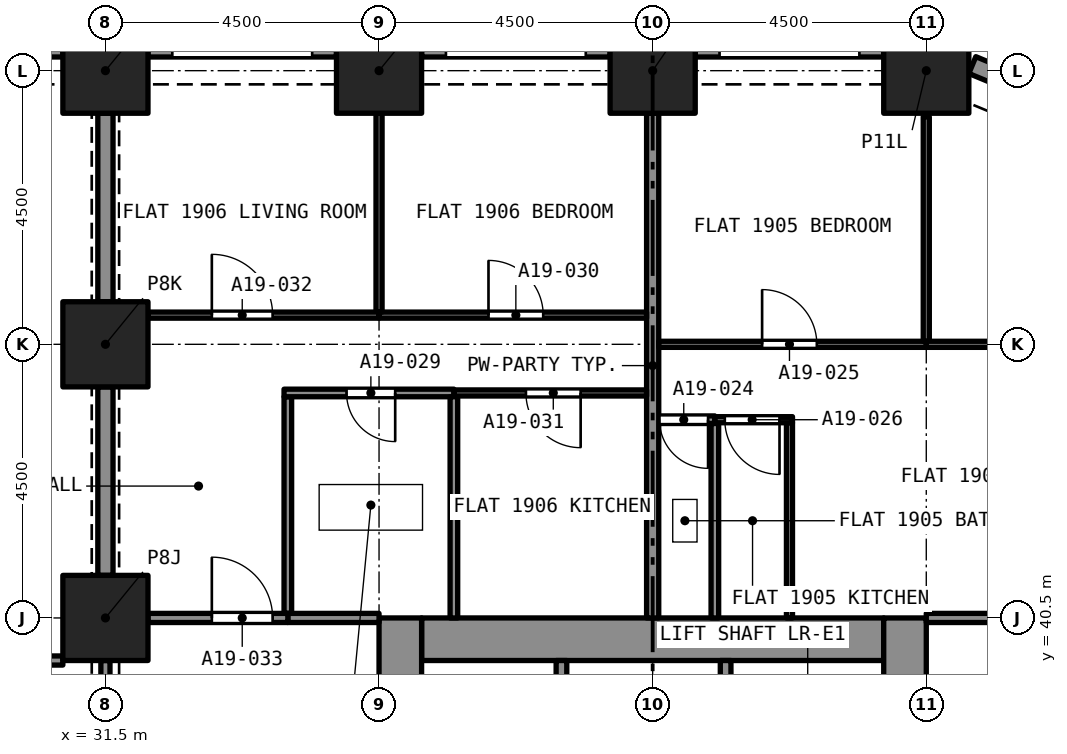
"""IFC4 building model, lengths in metres.
Left out: names, types, materials, properties, quantities, classifications, styles, units other than length and angle.
Written with IfcOpenShell. Run it as: python <this file> out.ifc"""

import sys

from ifc_helpers import new_model, si_unit, direction, frame, frame_2d, origin, origin_2d, place, context, subcontext, project, spatial, rectangle, extrude, element, fill, save


model = new_model("IFC4")
c1 = context("Model", 3, precision=1e-05, world=origin(), true_north=direction((0.0, 1.0)))
c2 = subcontext(c1, "Body", "Model", "MODEL_VIEW")
j1 = project(units=[si_unit("LENGTHUNIT", "METRE"), si_unit("PLANEANGLEUNIT", "RADIAN")], contexts=[c1])
p1 = place(None, origin())
s1 = spatial("IfcSite", under=j1, at=p1, CompositionType="ELEMENT")
p2 = place(p1, origin())
s2 = spatial("IfcBuilding", under=s1, at=p2, CompositionType="ELEMENT")
p3 = place(p2, frame((0.0, 0.0, 72.0)))
s3 = spatial("IfcBuildingStorey", under=s2, at=p3, CompositionType="ELEMENT", Elevation=72.0)
for number, where, z_axis, x_axis in (
    (1, (31.5, 40.5, 0.0), (0.0, 0.0, 1.0), (1.0, 0.0, 0.0)),
    (2, (31.5, 45.0, 0.0), (0.0, 0.0, 1.0), (1.0, 0.0, 0.0)),
    (3, (31.5, 49.5, 0.0), (0.0, 0.0, 1.0), (1.0, 0.0, 0.0)),
    (4, (36.0, 49.5, 0.0), (0.0, 0.0, 1.0), (1.0, 0.0, 0.0)),
    (5, (40.5, 49.5, 0.0), (0.0, 0.0, 1.0), (1.0, 0.0, 0.0)),
    (6, (45.0, 49.5, 0.0), (0.0, 0.0, 1.0), (1.0, 0.0, 0.0)),
):
    element("IfcColumn", number, at=place(p3, frame(where, z_axis=z_axis, x_axis=x_axis)), inside=s3, PredefinedType="COLUMN", context=c2, shape_type="SweptSolid", body=[
        extrude(rectangle(XDim=1.4, YDim=1.4, at=origin_2d()), origin(), (0.0, 0.0, 1.0), 3.2),
    ])
p4 = place(p3, frame((36.7, 40.15, 0.0), z_axis=(0.0, 0.0, 1.0), x_axis=(1.0, 0.0, 0.0)))
e7 = element("IfcWall", 7, at=p4, inside=s3, PredefinedType="SOLIDWALL", context=c2, shape_type="SweptSolid", body=[
    extrude(rectangle(XDim=7.6, YDim=0.7, at=frame_2d((3.8, 0.0))), origin(), (0.0, 0.0, 1.0), 3.2),
])
p5 = place(p3, frame((36.35, 27.0, 0.0), z_axis=(0.0, 0.0, 1.0), x_axis=(0.0, 1.0, 0.0)))
e8 = element("IfcWall", 8, at=p5, inside=s3, PredefinedType="SOLIDWALL", context=c2, shape_type="SweptSolid", body=[
    extrude(rectangle(XDim=13.5, YDim=0.7, at=frame_2d((6.75, 0.0))), origin(), (0.0, 0.0, 1.0), 3.2),
])
p6 = place(p5, frame((8.95, 0.0, 0.0)))
e9 = element("IfcOpeningElement", 9, at=p6, cuts=e8, PredefinedType="OPENING", context=c2, shape_type="SweptSolid", body=[
    extrude(rectangle(XDim=1.2, YDim=2.1, at=frame_2d((0.6, 1.05))), frame((0.0, 0.36, 0.0), z_axis=(0.0, -1.0, 0.0), x_axis=(1.0, 0.0, 0.0)), (0.0, 0.0, 1.0), 0.72),
])
p7 = place(p3, frame((44.65, 27.0, 0.0), z_axis=(0.0, 0.0, 1.0), x_axis=(0.0, 1.0, 0.0)))
e10 = element("IfcWall", 10, at=p7, inside=s3, PredefinedType="SOLIDWALL", context=c2, shape_type="SweptSolid", body=[
    extrude(rectangle(XDim=13.5, YDim=0.7, at=frame_2d((6.75, 0.0))), origin(), (0.0, 0.0, 1.0), 3.2),
])
p8 = place(p7, frame((8.95, 0.0, 0.0)))
e11 = element("IfcOpeningElement", 11, at=p8, cuts=e10, PredefinedType="OPENING", context=c2, shape_type="SweptSolid", body=[
    extrude(rectangle(XDim=1.2, YDim=2.1, at=frame_2d((0.6, 1.05))), frame((0.0, 0.36, 0.0), z_axis=(0.0, -1.0, 0.0), x_axis=(1.0, 0.0, 0.0)), (0.0, 0.0, 1.0), 0.72),
])
p9 = place(p3, frame((45.757, 49.592, 0.0), z_axis=(0.0, 0.0, 1.0), x_axis=(0.923857286003, -0.382737135771, 0.0)))
e12 = element("IfcWall", 12, at=p9, inside=s3, PredefinedType="SOLIDWALL", context=c2, shape_type="SweptSolid", body=[
    extrude(rectangle(XDim=1.865, YDim=0.3, at=frame_2d((0.933, 0.0))), origin(), (0.0, 0.0, 1.0), 3.2),
])
p10 = place(p9, frame((0.508, 0.0, 0.45)))
e13 = element("IfcOpeningElement", 13, at=p10, cuts=e12, PredefinedType="OPENING", context=c2, shape_type="SweptSolid", body=[
    extrude(rectangle(XDim=1.1, YDim=1.95, at=frame_2d((0.55, 0.975))), frame((0.0, 0.16, 0.0), z_axis=(0.0, -1.0, 0.0), x_axis=(1.0, 0.0, 0.0)), (0.0, 0.0, 1.0), 0.32),
])
p11 = place(p3, frame((41.2, 49.875, 0.0), z_axis=(0.0, 0.0, 1.0), x_axis=(1.0, 0.0, 0.0)))
e14 = element("IfcWall", 14, at=p11, inside=s3, PredefinedType="SOLIDWALL", context=c2, shape_type="SweptSolid", body=[
    extrude(rectangle(XDim=3.1, YDim=0.3, at=frame_2d((1.55, 0.0))), origin(), (0.0, 0.0, 1.0), 3.2),
])
p12 = place(p11, frame((0.4, 0.0, 0.45)))
e15 = element("IfcOpeningElement", 15, at=p12, cuts=e14, PredefinedType="OPENING", context=c2, shape_type="SweptSolid", body=[
    extrude(rectangle(XDim=2.3, YDim=1.95, at=frame_2d((1.15, 0.975))), frame((0.0, 0.16, 0.0), z_axis=(0.0, -1.0, 0.0), x_axis=(1.0, 0.0, 0.0)), (0.0, 0.0, 1.0), 0.32),
])
p13 = place(p3, frame((36.7, 49.875, 0.0), z_axis=(0.0, 0.0, 1.0), x_axis=(1.0, 0.0, 0.0)))
e16 = element("IfcWall", 16, at=p13, inside=s3, PredefinedType="SOLIDWALL", context=c2, shape_type="SweptSolid", body=[
    extrude(rectangle(XDim=3.1, YDim=0.3, at=frame_2d((1.55, 0.0))), origin(), (0.0, 0.0, 1.0), 3.2),
])
p14 = place(p13, frame((0.4, 0.0, 0.45)))
e17 = element("IfcOpeningElement", 17, at=p14, cuts=e16, PredefinedType="OPENING", context=c2, shape_type="SweptSolid", body=[
    extrude(rectangle(XDim=2.3, YDim=1.95, at=frame_2d((1.15, 0.975))), frame((0.0, 0.16, 0.0), z_axis=(0.0, -1.0, 0.0), x_axis=(1.0, 0.0, 0.0)), (0.0, 0.0, 1.0), 0.32),
])
p15 = place(p3, frame((32.2, 49.875, 0.0), z_axis=(0.0, 0.0, 1.0), x_axis=(1.0, 0.0, 0.0)))
e18 = element("IfcWall", 18, at=p15, inside=s3, PredefinedType="SOLIDWALL", context=c2, shape_type="SweptSolid", body=[
    extrude(rectangle(XDim=3.1, YDim=0.3, at=frame_2d((1.55, 0.0))), origin(), (0.0, 0.0, 1.0), 3.2),
])
p16 = place(p15, frame((0.4, 0.0, 0.45)))
e19 = element("IfcOpeningElement", 19, at=p16, cuts=e18, PredefinedType="OPENING", context=c2, shape_type="SweptSolid", body=[
    extrude(rectangle(XDim=2.3, YDim=1.95, at=frame_2d((1.15, 0.975))), frame((0.0, 0.16, 0.0), z_axis=(0.0, -1.0, 0.0), x_axis=(1.0, 0.0, 0.0)), (0.0, 0.0, 1.0), 0.32),
])
p17 = place(p3, frame((27.7, 49.875, 0.0), z_axis=(0.0, 0.0, 1.0), x_axis=(1.0, 0.0, 0.0)))
e20 = element("IfcWall", 20, at=p17, inside=s3, PredefinedType="SOLIDWALL", context=c2, shape_type="SweptSolid", body=[
    extrude(rectangle(XDim=3.1, YDim=0.3, at=frame_2d((1.55, 0.0))), origin(), (0.0, 0.0, 1.0), 3.2),
])
p18 = place(p17, frame((0.4, 0.0, 0.45)))
e21 = element("IfcOpeningElement", 21, at=p18, cuts=e20, PredefinedType="OPENING", context=c2, shape_type="SweptSolid", body=[
    extrude(rectangle(XDim=2.3, YDim=1.95, at=frame_2d((1.15, 0.975))), frame((0.0, 0.16, 0.0), z_axis=(0.0, -1.0, 0.0), x_axis=(1.0, 0.0, 0.0)), (0.0, 0.0, 1.0), 0.32),
])
p19 = place(p3, frame((41.523, 43.76, 0.0), z_axis=(0.0, 0.0, 1.0), x_axis=(-1.0, 0.0, 0.0)))
e22 = element("IfcWall", 22, at=p19, inside=s3, PredefinedType="PARTITIONING", context=c2, shape_type="SweptSolid", body=[
    extrude(rectangle(XDim=0.923, YDim=0.125, at=frame_2d((0.461, 0.0))), origin(), (0.0, 0.0, 1.0), 2.7),
])
p20 = place(p19, frame((0.111, 0.0, 0.0)))
e23 = element("IfcOpeningElement", 23, at=p20, cuts=e22, PredefinedType="OPENING", context=c2, shape_type="SweptSolid", body=[
    extrude(rectangle(XDim=0.8, YDim=2.1, at=frame_2d((0.4, 1.05))), frame((0.0, 0.073, 0.0), z_axis=(0.0, -1.0, 0.0), x_axis=(1.0, 0.0, 0.0)), (0.0, 0.0, 1.0), 0.145),
])
p21 = place(p3, frame((41.523, 40.5, 0.0), z_axis=(0.0, 0.0, 1.0), x_axis=(0.0, 1.0, 0.0)))
e24 = element("IfcWall", 24, at=p21, inside=s3, PredefinedType="PARTITIONING", context=c2, shape_type="SweptSolid", body=[
    extrude(rectangle(XDim=3.198, YDim=0.125, at=frame_2d((1.599, 0.0))), origin(), (0.0, 0.0, 1.0), 2.7),
])
p22 = place(p3, frame((40.5, 40.5, 0.0), z_axis=(0.0, 0.0, 1.0), x_axis=(0.0, 1.0, 0.0)))
e25 = element("IfcWall", 25, at=p22, inside=s3, PredefinedType="PARTITIONING", context=c2, shape_type="SweptSolid", body=[
    extrude(rectangle(XDim=8.3, YDim=0.2, at=frame_2d((4.15, 0.0))), origin(), (0.0, 0.0, 1.0), 2.7),
])
p23 = place(p3, frame((40.6, 45.0, 0.0), z_axis=(0.0, 0.0, 1.0), x_axis=(1.0, 0.0, 0.0)))
e26 = element("IfcWall", 26, at=p23, inside=s3, PredefinedType="PARTITIONING", context=c2, shape_type="SweptSolid", body=[
    extrude(rectangle(XDim=4.4, YDim=0.1, at=frame_2d((2.2, 0.0))), origin(), (0.0, 0.0, 1.0), 2.7),
])
p24 = place(p23, frame((1.7, 0.0, 0.0)))
e27 = element("IfcOpeningElement", 27, at=p24, cuts=e26, PredefinedType="OPENING", context=c2, shape_type="SweptSolid", body=[
    extrude(rectangle(XDim=0.9, YDim=2.1, at=frame_2d((0.45, 1.05))), frame((0.0, 0.06, 0.0), z_axis=(0.0, -1.0, 0.0), x_axis=(1.0, 0.0, 0.0)), (0.0, 0.0, 1.0), 0.12),
])
p25 = place(p3, frame((45.0, 45.05, 0.0), z_axis=(0.0, 0.0, 1.0), x_axis=(0.0, 1.0, 0.0)))
e28 = element("IfcWall", 28, at=p25, inside=s3, PredefinedType="PARTITIONING", context=c2, shape_type="SweptSolid", body=[
    extrude(rectangle(XDim=3.692, YDim=0.1, at=frame_2d((1.846, 0.0))), origin(), (0.0, 0.0, 1.0), 2.7),
])
p26 = place(p3, frame((42.75, 40.5, 0.0), z_axis=(0.0, 0.0, 1.0), x_axis=(0.0, 1.0, 0.0)))
e29 = element("IfcWall", 29, at=p26, inside=s3, PredefinedType="PARTITIONING", context=c2, shape_type="SweptSolid", body=[
    extrude(rectangle(XDim=3.21, YDim=0.1, at=frame_2d((1.605, 0.0))), origin(), (0.0, 0.0, 1.0), 2.7),
])
p27 = place(p3, frame((42.8, 43.76, 0.0), z_axis=(0.0, 0.0, 1.0), x_axis=(-1.0, 0.0, 0.0)))
e30 = element("IfcWall", 30, at=p27, inside=s3, PredefinedType="PARTITIONING", context=c2, shape_type="SweptSolid", body=[
    extrude(rectangle(XDim=1.277, YDim=0.1, at=frame_2d((0.639, 0.0))), origin(), (0.0, 0.0, 1.0), 2.7),
])
p28 = place(p27, frame((0.214, 0.0, 0.0)))
e31 = element("IfcOpeningElement", 31, at=p28, cuts=e30, PredefinedType="OPENING", context=c2, shape_type="SweptSolid", body=[
    extrude(rectangle(XDim=0.9, YDim=2.1, at=frame_2d((0.45, 1.05))), frame((0.0, 0.06, 0.0), z_axis=(0.0, -1.0, 0.0), x_axis=(1.0, 0.0, 0.0)), (0.0, 0.0, 1.0), 0.12),
])
p29 = place(p3, frame((45.0, 45.0, 0.0), z_axis=(0.0, 0.0, 1.0), x_axis=(1.0, 0.0, 0.0)))
e32 = element("IfcWall", 32, at=p29, inside=s3, PredefinedType="PARTITIONING", context=c2, shape_type="SweptSolid", body=[
    extrude(rectangle(XDim=3.742, YDim=0.1, at=frame_2d((1.871, 0.0))), origin(), (0.0, 0.0, 1.0), 2.7),
])
p30 = place(p29, frame((1.4, 0.0, 0.0)))
e33 = element("IfcOpeningElement", 33, at=p30, cuts=e32, PredefinedType="OPENING", context=c2, shape_type="SweptSolid", body=[
    extrude(rectangle(XDim=1.0, YDim=2.1, at=frame_2d((0.5, 1.05))), frame((0.0, 0.06, 0.0), z_axis=(0.0, -1.0, 0.0), x_axis=(1.0, 0.0, 0.0)), (0.0, 0.0, 1.0), 0.12),
])
p31 = place(p3, frame((45.0, 40.5, 0.0), z_axis=(0.0, 0.0, 1.0), x_axis=(1.0, 0.0, 0.0)))
e34 = element("IfcWall", 34, at=p31, inside=s3, PredefinedType="PARTITIONING", context=c2, shape_type="SweptSolid", body=[
    extrude(rectangle(XDim=3.8, YDim=0.15, at=frame_2d((1.9, 0.0))), origin(), (0.0, 0.0, 1.0), 2.7),
])
p32 = place(p31, frame((1.75, 0.0, 0.0)))
e35 = element("IfcOpeningElement", 35, at=p32, cuts=e34, PredefinedType="OPENING", context=c2, shape_type="SweptSolid", body=[
    extrude(rectangle(XDim=1.0, YDim=2.1, at=frame_2d((0.5, 1.05))), frame((0.0, 0.085, 0.0), z_axis=(0.0, -1.0, 0.0), x_axis=(1.0, 0.0, 0.0)), (0.0, 0.0, 1.0), 0.17),
])
p33 = place(p3, frame((34.5, 40.575, 0.0), z_axis=(0.0, 0.0, 1.0), x_axis=(0.0, 1.0, 0.0)))
e36 = element("IfcWall", 36, at=p33, inside=s3, PredefinedType="PARTITIONING", context=c2, shape_type="SweptSolid", body=[
    extrude(rectangle(XDim=3.562, YDim=0.125, at=frame_2d((1.781, 0.0))), origin(), (0.0, 0.0, 1.0), 2.7),
])
p34 = place(p3, frame((37.231, 44.2, 0.0), z_axis=(0.0, 0.0, 1.0), x_axis=(-1.0, 0.0, 0.0)))
e37 = element("IfcWall", 37, at=p34, inside=s3, PredefinedType="PARTITIONING", context=c2, shape_type="SweptSolid", body=[
    extrude(rectangle(XDim=2.794, YDim=0.125, at=frame_2d((1.397, 0.0))), origin(), (0.0, 0.0, 1.0), 2.7),
])
p35 = place(p34, frame((0.966, 0.0, 0.0)))
e38 = element("IfcOpeningElement", 38, at=p35, cuts=e37, PredefinedType="OPENING", context=c2, shape_type="SweptSolid", body=[
    extrude(rectangle(XDim=0.8, YDim=2.1, at=frame_2d((0.4, 1.05))), frame((0.0, 0.073, 0.0), z_axis=(0.0, -1.0, 0.0), x_axis=(1.0, 0.0, 0.0)), (0.0, 0.0, 1.0), 0.145),
])
p36 = place(p3, frame((37.231, 40.5, 0.0), z_axis=(0.0, 0.0, 1.0), x_axis=(0.0, 1.0, 0.0)))
e39 = element("IfcWall", 39, at=p36, inside=s3, PredefinedType="PARTITIONING", context=c2, shape_type="SweptSolid", body=[
    extrude(rectangle(XDim=3.637, YDim=0.125, at=frame_2d((1.819, 0.0))), origin(), (0.0, 0.0, 1.0), 2.7),
])
p37 = place(p3, frame((34.5, 40.5, 0.0), z_axis=(0.0, 0.0, 1.0), x_axis=(1.0, 0.0, 0.0)))
e40 = element("IfcWall", 40, at=p37, inside=s3, PredefinedType="PARTITIONING", context=c2, shape_type="SweptSolid", body=[
    extrude(rectangle(XDim=1.5, YDim=0.15, at=frame_2d((0.75, 0.0))), origin(), (0.0, 0.0, 1.0), 2.7),
])
p38 = place(p3, frame((36.0, 45.48, 0.0), z_axis=(0.0, 0.0, 1.0), x_axis=(1.0, 0.0, 0.0)))
e41 = element("IfcWall", 41, at=p38, inside=s3, PredefinedType="PARTITIONING", context=c2, shape_type="SweptSolid", body=[
    extrude(rectangle(XDim=4.4, YDim=0.1, at=frame_2d((2.2, 0.0))), origin(), (0.0, 0.0, 1.0), 2.7),
])
p39 = place(p38, frame((1.8, 0.0, 0.0)))
e42 = element("IfcOpeningElement", 42, at=p39, cuts=e41, PredefinedType="OPENING", context=c2, shape_type="SweptSolid", body=[
    extrude(rectangle(XDim=0.9, YDim=2.1, at=frame_2d((0.45, 1.05))), frame((0.0, 0.06, 0.0), z_axis=(0.0, -1.0, 0.0), x_axis=(1.0, 0.0, 0.0)), (0.0, 0.0, 1.0), 0.12),
])
p40 = place(p3, frame((36.0, 45.53, 0.0), z_axis=(0.0, 0.0, 1.0), x_axis=(0.0, 1.0, 0.0)))
e43 = element("IfcWall", 43, at=p40, inside=s3, PredefinedType="PARTITIONING", context=c2, shape_type="SweptSolid", body=[
    extrude(rectangle(XDim=3.27, YDim=0.1, at=frame_2d((1.635, 0.0))), origin(), (0.0, 0.0, 1.0), 2.7),
])
p41 = place(p3, frame((40.4, 44.2, 0.0), z_axis=(0.0, 0.0, 1.0), x_axis=(-1.0, 0.0, 0.0)))
e44 = element("IfcWall", 44, at=p41, inside=s3, PredefinedType="PARTITIONING", context=c2, shape_type="SweptSolid", body=[
    extrude(rectangle(XDim=3.168, YDim=0.1, at=frame_2d((1.584, 0.0))), origin(), (0.0, 0.0, 1.0), 2.7),
])
p42 = place(p41, frame((1.084, 0.0, 0.0)))
e45 = element("IfcOpeningElement", 45, at=p42, cuts=e44, PredefinedType="OPENING", context=c2, shape_type="SweptSolid", body=[
    extrude(rectangle(XDim=0.9, YDim=2.1, at=frame_2d((0.45, 1.05))), frame((0.0, 0.06, 0.0), z_axis=(0.0, -1.0, 0.0), x_axis=(1.0, 0.0, 0.0)), (0.0, 0.0, 1.0), 0.12),
])
p43 = place(p3, frame((32.2, 45.48, 0.0), z_axis=(0.0, 0.0, 1.0), x_axis=(1.0, 0.0, 0.0)))
e46 = element("IfcWall", 46, at=p43, inside=s3, PredefinedType="PARTITIONING", context=c2, shape_type="SweptSolid", body=[
    extrude(rectangle(XDim=3.8, YDim=0.1, at=frame_2d((1.9, 0.0))), origin(), (0.0, 0.0, 1.0), 2.7),
])
p44 = place(p43, frame((1.05, 0.0, 0.0)))
e47 = element("IfcOpeningElement", 47, at=p44, cuts=e46, PredefinedType="OPENING", context=c2, shape_type="SweptSolid", body=[
    extrude(rectangle(XDim=1.0, YDim=2.1, at=frame_2d((0.5, 1.05))), frame((0.0, 0.06, 0.0), z_axis=(0.0, -1.0, 0.0), x_axis=(1.0, 0.0, 0.0)), (0.0, 0.0, 1.0), 0.12),
])
p45 = place(p3, frame((31.5, 41.2, 0.0), z_axis=(0.0, 0.0, 1.0), x_axis=(0.0, 1.0, 0.0)))
e48 = element("IfcWall", 48, at=p45, inside=s3, PredefinedType="PARTITIONING", context=c2, shape_type="SweptSolid", body=[
    extrude(rectangle(XDim=3.1, YDim=0.25, at=frame_2d((1.55, 0.0))), origin(), (0.0, 0.0, 1.0), 2.38),
])
p46 = place(p3, frame((32.2, 40.5, 0.0), z_axis=(0.0, 0.0, 1.0), x_axis=(1.0, 0.0, 0.0)))
e49 = element("IfcWall", 49, at=p46, inside=s3, PredefinedType="PARTITIONING", context=c2, shape_type="SweptSolid", body=[
    extrude(rectangle(XDim=2.3, YDim=0.15, at=frame_2d((1.15, 0.0))), origin(), (0.0, 0.0, 1.0), 2.7),
])
p47 = place(p46, frame((1.05, 0.0, 0.0)))
e50 = element("IfcOpeningElement", 50, at=p47, cuts=e49, PredefinedType="OPENING", context=c2, shape_type="SweptSolid", body=[
    extrude(rectangle(XDim=1.0, YDim=2.1, at=frame_2d((0.5, 1.05))), frame((0.0, 0.085, 0.0), z_axis=(0.0, -1.0, 0.0), x_axis=(1.0, 0.0, 0.0)), (0.0, 0.0, 1.0), 0.17),
])
p48 = place(p3, frame((31.5, 45.7, 0.0), z_axis=(0.0, 0.0, 1.0), x_axis=(0.0, 1.0, 0.0)))
e51 = element("IfcWall", 51, at=p48, inside=s3, PredefinedType="PARTITIONING", context=c2, shape_type="SweptSolid", body=[
    extrude(rectangle(XDim=3.1, YDim=0.25, at=frame_2d((1.55, 0.0))), origin(), (0.0, 0.0, 1.0), 2.38),
])
p49 = place(p3, frame((18.7, 39.8, 0.0), z_axis=(0.0, 0.0, 1.0), x_axis=(1.0, 0.0, 0.0)))
e52 = element("IfcWall", 52, at=p49, inside=s3, PredefinedType="PARTITIONING", context=c2, shape_type="SweptSolid", body=[
    extrude(rectangle(XDim=12.1, YDim=0.15, at=frame_2d((6.05, 0.0))), origin(), (0.0, 0.0, 1.0), 2.7),
])
p50 = place(p49, frame((5.55, 0.0, 0.0)))
e53 = element("IfcOpeningElement", 53, at=p50, cuts=e52, PredefinedType="OPENING", context=c2, shape_type="SweptSolid", body=[
    extrude(rectangle(XDim=1.0, YDim=2.1, at=frame_2d((0.5, 1.05))), frame((0.0, 0.085, 0.0), z_axis=(0.0, -1.0, 0.0), x_axis=(1.0, 0.0, 0.0)), (0.0, 0.0, 1.0), 0.17),
])
p51 = place(p3, frame((31.5, 36.7, 0.0), z_axis=(0.0, 0.0, 1.0), x_axis=(0.0, 1.0, 0.0)))
e54 = element("IfcWall", 54, at=p51, inside=s3, PredefinedType="PARTITIONING", context=c2, shape_type="SweptSolid", body=[
    extrude(rectangle(XDim=3.1, YDim=0.15, at=frame_2d((1.55, 0.0))), origin(), (0.0, 0.0, 1.0), 2.38),
])
p52 = place(p51, frame((0.95, 0.0, 0.0)))
e55 = element("IfcOpeningElement", 55, at=p52, cuts=e54, PredefinedType="OPENING", context=c2, shape_type="SweptSolid", body=[
    extrude(rectangle(XDim=1.2, YDim=2.1, at=frame_2d((0.6, 1.05))), frame((0.0, 0.085, 0.0), z_axis=(0.0, -1.0, 0.0), x_axis=(1.0, 0.0, 0.0)), (0.0, 0.0, 1.0), 0.17),
])
for number, where, z_axis, x_axis in (
    (56, (41.7, 37.5, 0.0), (0.0, 0.0, 1.0), (0.0, 1.0, 0.0)),
    (57, (39.0, 37.5, 0.0), (0.0, 0.0, 1.0), (0.0, 1.0, 0.0)),
):
    element("IfcWall", number, at=place(p3, frame(where, z_axis=z_axis, x_axis=x_axis)), inside=s3, PredefinedType="SOLIDWALL", context=c2, shape_type="SweptSolid", body=[
        extrude(rectangle(XDim=2.3, YDim=0.175, at=frame_2d((1.15, 0.0))), origin(), (0.0, 0.0, 1.0), 2.7),
    ])
p53 = place(p20, origin())
e58 = element("IfcDoor", 58, at=p53, inside=s3, OperationType="SINGLE_SWING_RIGHT", PredefinedType="DOOR", context=c2, shape_type="SweptSolid", body=[
    extrude(rectangle(XDim=0.8, YDim=2.1, at=frame_2d((0.4, 1.05))), frame((0.0, 0.025, 0.0), z_axis=(0.0, -1.0, 0.0), x_axis=(1.0, 0.0, 0.0)), (0.0, 0.0, 1.0), 0.05),
])
fill(e23, e58)
p54 = place(p24, origin())
e59 = element("IfcDoor", 59, at=p54, inside=s3, OperationType="SINGLE_SWING_LEFT", PredefinedType="DOOR", context=c2, shape_type="SweptSolid", body=[
    extrude(rectangle(XDim=0.9, YDim=2.1, at=frame_2d((0.45, 1.05))), frame((0.0, 0.025, 0.0), z_axis=(0.0, -1.0, 0.0), x_axis=(1.0, 0.0, 0.0)), (0.0, 0.0, 1.0), 0.05),
])
fill(e27, e59)
p55 = place(p28, origin())
e60 = element("IfcDoor", 60, at=p55, inside=s3, OperationType="SINGLE_SWING_RIGHT", PredefinedType="DOOR", context=c2, shape_type="SweptSolid", body=[
    extrude(rectangle(XDim=0.9, YDim=2.1, at=frame_2d((0.45, 1.05))), frame((0.0, 0.025, 0.0), z_axis=(0.0, -1.0, 0.0), x_axis=(1.0, 0.0, 0.0)), (0.0, 0.0, 1.0), 0.05),
])
fill(e31, e60)
p56 = place(p35, origin())
e61 = element("IfcDoor", 61, at=p56, inside=s3, OperationType="SINGLE_SWING_LEFT", PredefinedType="DOOR", context=c2, shape_type="SweptSolid", body=[
    extrude(rectangle(XDim=0.8, YDim=2.1, at=frame_2d((0.4, 1.05))), frame((0.0, 0.025, 0.0), z_axis=(0.0, -1.0, 0.0), x_axis=(1.0, 0.0, 0.0)), (0.0, 0.0, 1.0), 0.05),
])
fill(e38, e61)
p57 = place(p39, origin())
e62 = element("IfcDoor", 62, at=p57, inside=s3, OperationType="SINGLE_SWING_RIGHT", PredefinedType="DOOR", context=c2, shape_type="SweptSolid", body=[
    extrude(rectangle(XDim=0.9, YDim=2.1, at=frame_2d((0.45, 1.05))), frame((0.0, 0.025, 0.0), z_axis=(0.0, -1.0, 0.0), x_axis=(1.0, 0.0, 0.0)), (0.0, 0.0, 1.0), 0.05),
])
fill(e42, e62)
p58 = place(p42, origin())
e63 = element("IfcDoor", 63, at=p58, inside=s3, OperationType="SINGLE_SWING_LEFT", PredefinedType="DOOR", context=c2, shape_type="SweptSolid", body=[
    extrude(rectangle(XDim=0.9, YDim=2.1, at=frame_2d((0.45, 1.05))), frame((0.0, 0.025, 0.0), z_axis=(0.0, -1.0, 0.0), x_axis=(1.0, 0.0, 0.0)), (0.0, 0.0, 1.0), 0.05),
])
fill(e45, e63)
p59 = place(p44, origin())
e64 = element("IfcDoor", 64, at=p59, inside=s3, OperationType="SINGLE_SWING_LEFT", PredefinedType="DOOR", context=c2, shape_type="SweptSolid", body=[
    extrude(rectangle(XDim=1.0, YDim=2.1, at=frame_2d((0.5, 1.05))), frame((0.0, 0.025, 0.0), z_axis=(0.0, -1.0, 0.0), x_axis=(1.0, 0.0, 0.0)), (0.0, 0.0, 1.0), 0.05),
])
fill(e47, e64)
p60 = place(p47, origin())
e65 = element("IfcDoor", 65, at=p60, inside=s3, OperationType="SINGLE_SWING_RIGHT", PredefinedType="DOOR", context=c2, shape_type="SweptSolid", body=[
    extrude(rectangle(XDim=1.0, YDim=2.1, at=frame_2d((0.5, 1.05))), frame((0.0, 0.025, 0.0), z_axis=(0.0, -1.0, 0.0), x_axis=(1.0, 0.0, 0.0)), (0.0, 0.0, 1.0), 0.05),
])
fill(e50, e65)
save(model, sys.argv[1])
